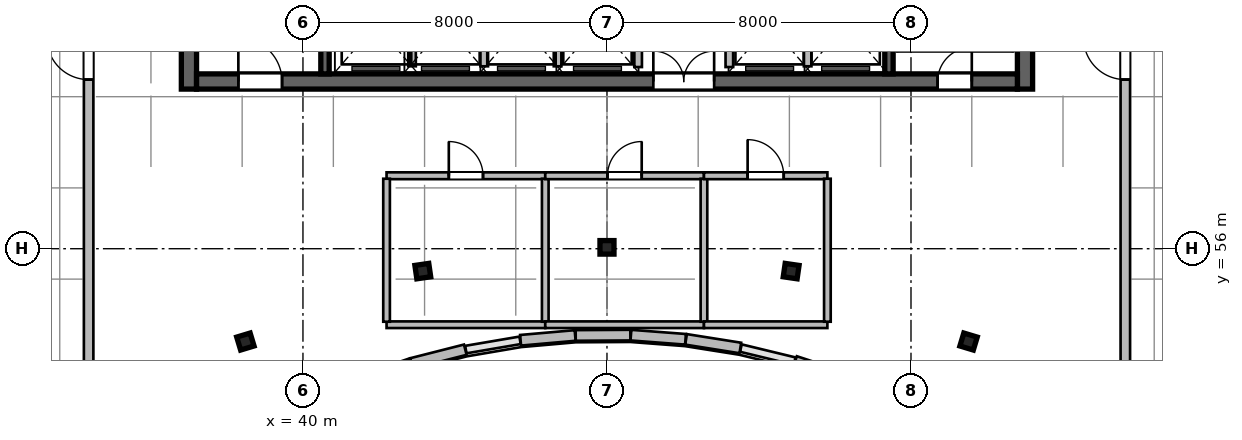
"""IFC4 building model, lengths in metres.
Left out: names, types, materials, properties, quantities, classifications, styles, units other than length and angle.
Written with IfcOpenShell. Run it as: python <this file> out.ifc"""

import sys

from ifc_helpers import new_model, si_unit, direction, frame, frame_2d, origin, origin_2d, place, context, subcontext, project, spatial, rectangle, i_section, extrude, source, transform, mapped, element, fill, save


model = new_model("IFC4")
c1 = context("Model", 3, precision=1e-05, world=origin(), true_north=direction((0.0, 1.0)))
c2 = subcontext(c1, "Body", "Model", "MODEL_VIEW")
j1 = project(units=[si_unit("LENGTHUNIT", "METRE"), si_unit("PLANEANGLEUNIT", "RADIAN")], contexts=[c1])
p1 = place(None, origin())
s1 = spatial("IfcSite", under=j1, at=p1, CompositionType="ELEMENT")
p2 = place(p1, origin())
s2 = spatial("IfcBuilding", under=s1, at=p2, CompositionType="ELEMENT")
p3 = place(p2, frame((0.0, 0.0, 307.8)))
s3 = spatial("IfcBuildingStorey", under=s2, at=p3, CompositionType="ELEMENT", Elevation=307.8)
m1 = source(origin(), c2, "Body", "SweptSolid", [
    extrude(rectangle(XDim=12.0, YDim=0.4, at=frame_2d((6.0, 0.0))), origin(), (0.0, 0.0, 1.0), 4.8),
])
for number, where, z_axis, x_axis in (
    (1, (37.0, 60.2, 0.0), (0.0, 0.0, 1.0), (0.0, 1.0, 0.0)),
    (2, (59.0, 60.2, 0.0), (0.0, 0.0, 1.0), (0.0, 1.0, 0.0)),
):
    element("IfcWall", number, at=place(p3, frame(where, z_axis=z_axis, x_axis=x_axis)), inside=s3, PredefinedType="SHEAR", context=c2, shape_type="MappedRepresentation", body=[
        mapped(m1, transform((0.0, 0.0, 0.0), scale=1.0)),
    ])
m2 = source(origin(), c2, "Body", "SweptSolid", [
    extrude(rectangle(XDim=21.6, YDim=0.4, at=frame_2d((10.8, 0.0))), origin(), (0.0, 0.0, 1.0), 4.8),
])
p4 = place(p3, frame((37.2, 60.4, 0.0), z_axis=(0.0, 0.0, 1.0), x_axis=(1.0, 0.0, 0.0)))
e3 = element("IfcWall", 3, at=p4, inside=s3, PredefinedType="SHEAR", context=c2, shape_type="MappedRepresentation", body=[
    mapped(m2, transform((0.0, 0.0, 0.0), scale=1.0)),
])
p5 = place(p4, frame((1.1, 0.0, 0.0)))
e4 = element("IfcOpeningElement", 4, at=p5, cuts=e3, PredefinedType="OPENING", context=c2, shape_type="SweptSolid", body=[
    extrude(rectangle(XDim=1.15, YDim=2.15, at=frame_2d((0.575, 1.075))), frame((0.0, 0.21, 0.0), z_axis=(0.0, -1.0, 0.0), x_axis=(1.0, 0.0, 0.0)), (0.0, 0.0, 1.0), 0.42),
])
p6 = place(p4, frame((19.5, 0.0, 0.0)))
e5 = element("IfcOpeningElement", 5, at=p6, cuts=e3, PredefinedType="OPENING", context=c2, shape_type="SweptSolid", body=[
    extrude(rectangle(XDim=0.9, YDim=2.1, at=frame_2d((0.45, 1.05))), frame((0.0, 0.21, 0.0), z_axis=(0.0, -1.0, 0.0), x_axis=(1.0, 0.0, 0.0)), (0.0, 0.0, 1.0), 0.42),
])
p7 = place(p4, frame((12.02, 0.0, 0.0)))
e6 = element("IfcOpeningElement", 6, at=p7, cuts=e3, PredefinedType="OPENING", context=c2, shape_type="SweptSolid", body=[
    extrude(rectangle(XDim=1.6, YDim=2.15, at=frame_2d((0.8, 1.075))), frame((0.0, 0.21, 0.0), z_axis=(0.0, -1.0, 0.0), x_axis=(1.0, 0.0, 0.0)), (0.0, 0.0, 1.0), 0.42),
])
m3 = source(origin(), c2, "Body", "SweptSolid", [
    extrude(rectangle(XDim=11.2, YDim=0.22, at=frame_2d((5.6, 0.0))), origin(), (0.0, 0.0, 1.0), 4.8),
])
p8 = place(p3, frame((40.58, 60.6, 0.0), z_axis=(0.0, 0.0, 1.0), x_axis=(0.0, 1.0, 0.0)))
e7 = element("IfcWall", 7, at=p8, inside=s3, PredefinedType="SHEAR", context=c2, shape_type="MappedRepresentation", body=[
    mapped(m3, transform((0.0, 0.0, 0.0), scale=1.0)),
])
p9 = place(p3, frame((55.42, 60.6, 0.0), z_axis=(0.0, 0.0, 1.0), x_axis=(0.0, 1.0, 0.0)))
e8 = element("IfcWall", 8, at=p9, inside=s3, PredefinedType="SHEAR", context=c2, shape_type="MappedRepresentation", body=[
    mapped(m3, transform((0.0, 0.0, 0.0), scale=1.0)),
])
p10 = place(p9, frame((9.645, 0.0, 0.0)))
e9 = element("IfcOpeningElement", 9, at=p10, cuts=e8, PredefinedType="OPENING", context=c2, shape_type="SweptSolid", body=[
    extrude(rectangle(XDim=1.15, YDim=2.15, at=frame_2d((0.575, 1.075))), frame((0.0, 0.12, 0.0), z_axis=(0.0, -1.0, 0.0), x_axis=(1.0, 0.0, 0.0)), (0.0, 0.0, 1.0), 0.24),
])
m4 = source(origin(), c2, "Body", "SweptSolid", [
    extrude(i_section(OverallWidth=0.369, OverallDepth=0.356, WebThickness=0.011, FlangeThickness=0.018, at=origin_2d()), origin(), (0.0, 0.0, 1.0), 4.8),
])
for number, where, z_axis, x_axis in (
    (10, (38.485, 53.558, 0.0), (0.0, 0.0, 1.0), (-0.289, 0.957, 0.0)),
    (11, (43.154, 55.411, 0.0), (0.0, 0.0, 1.0), (-0.143, 0.99, 0.0)),
    (12, (48.0, 56.036, 0.0), (0.0, 0.0, 1.0), (0.0, 1.0, 0.0)),
    (13, (52.846, 55.411, 0.0), (0.0, 0.0, 1.0), (0.143, 0.99, 0.0)),
    (14, (57.515, 53.558, 0.0), (0.0, 0.0, 1.0), (0.289, 0.957, 0.0)),
):
    element("IfcColumn", number, at=place(p3, frame(where, z_axis=z_axis, x_axis=x_axis)), inside=s3, PredefinedType="COLUMN", context=c2, shape_type="MappedRepresentation", body=[
        mapped(m4, transform((0.0, 0.0, 0.0), scale=1.0)),
    ])
m5 = source(origin(), c2, "Body", "SweptSolid", [
    extrude(rectangle(XDim=1.47, YDim=0.28, at=frame_2d((0.735, 0.0))), origin(), (0.0, 0.0, 1.0), 4.5),
])
p11 = place(p3, frame((54.35, 52.58, 0.0), z_axis=(0.0, 0.0, 1.0), x_axis=(-0.950248878954, 0.311491682145, 0.0)))
e15 = element("IfcWall", 15, at=p11, inside=s3, PredefinedType="SOLIDWALL", context=c2, shape_type="MappedRepresentation", body=[
    mapped(m5, transform((0.0, 0.0, 0.0), scale=1.0)),
])
m6 = source(origin(), c2, "Body", "SweptSolid", [
    extrude(rectangle(XDim=1.446, YDim=0.28, at=frame_2d((0.723, 0.0))), origin(), (0.0, 0.0, 1.0), 4.5),
])
p12 = place(p3, frame((51.509, 53.388, 0.0), z_axis=(0.0, 0.0, 1.0), x_axis=(-0.987650460941, 0.156673440642, 0.0)))
e16 = element("IfcWall", 16, at=p12, inside=s3, PredefinedType="SOLIDWALL", context=c2, shape_type="MappedRepresentation", body=[
    mapped(m6, transform((0.0, 0.0, 0.0), scale=1.0)),
])
m7 = source(origin(), c2, "Body", "SweptSolid", [
    extrude(rectangle(XDim=1.44, YDim=0.28, at=frame_2d((0.72, 0.0))), origin(), (0.0, 0.0, 1.0), 4.5),
])
p13 = place(p3, frame((50.066, 53.616, 0.0), z_axis=(0.0, 0.0, 1.0), x_axis=(-0.997124860794, 0.075776064736, 0.0)))
e17 = element("IfcWall", 17, at=p13, inside=s3, PredefinedType="SOLIDWALL", context=c2, shape_type="MappedRepresentation", body=[
    mapped(m7, transform((0.0, 0.0, 0.0), scale=1.0)),
])
m8 = source(origin(), c2, "Body", "SweptSolid", [
    extrude(rectangle(XDim=1.438, YDim=0.28, at=frame_2d((0.719, 0.0))), origin(), (0.0, 0.0, 1.0), 4.5),
])
p14 = place(p3, frame((48.615, 53.726, 0.0), z_axis=(0.0, 0.0, 1.0), x_axis=(-0.999982357135, -0.005940153174, 0.0)))
e18 = element("IfcWall", 18, at=p14, inside=s3, PredefinedType="SOLIDWALL", context=c2, shape_type="MappedRepresentation", body=[
    mapped(m8, transform((0.0, 0.0, 0.0), scale=1.0)),
])
m9 = source(origin(), c2, "Body", "SweptSolid", [
    extrude(rectangle(XDim=1.441, YDim=0.28, at=frame_2d((0.72, 0.0))), origin(), (0.0, 0.0, 1.0), 4.5),
])
p15 = place(p3, frame((47.162, 53.717, 0.0), z_axis=(0.0, 0.0, 1.0), x_axis=(-0.99617032352, -0.087433898101, 0.0)))
e19 = element("IfcWall", 19, at=p15, inside=s3, PredefinedType="SOLIDWALL", context=c2, shape_type="MappedRepresentation", body=[
    mapped(m9, transform((0.0, 0.0, 0.0), scale=1.0)),
])
m10 = source(origin(), c2, "Body", "SweptSolid", [
    extrude(rectangle(XDim=1.458, YDim=0.28, at=frame_2d((0.729, 0.0))), origin(), (0.0, 0.0, 1.0), 4.5),
])
p16 = place(p3, frame((44.271, 53.343, 0.0), z_axis=(0.0, 0.0, 1.0), x_axis=(-0.969109544438, -0.246630677083, 0.0)))
e20 = element("IfcWall", 20, at=p16, inside=s3, PredefinedType="SOLIDWALL", context=c2, shape_type="MappedRepresentation", body=[
    mapped(m10, transform((0.0, 0.0, 0.0), scale=1.0)),
])
m11 = source(origin(), c2, "Body", "SweptSolid", [
    extrude(rectangle(XDim=1.473, YDim=0.28, at=frame_2d((0.736, 0.0))), origin(), (0.0, 0.0, 1.0), 4.5),
])
p17 = place(p3, frame((42.845, 52.979, 0.0), z_axis=(0.0, 0.0, 1.0), x_axis=(-0.946641296917, -0.322289086026, 0.0)))
e21 = element("IfcWall", 21, at=p17, inside=s3, PredefinedType="SOLIDWALL", context=c2, shape_type="MappedRepresentation", body=[
    mapped(m11, transform((0.0, 0.0, 0.0), scale=1.0)),
])
m12 = source(origin(), c2, "Body", "SweptSolid", [
    extrude(rectangle(XDim=2.24, YDim=0.2, at=frame_2d((1.12, 0.0))), origin(), (0.0, 0.0, 1.0), 4.5),
])
for number, where, z_axis, x_axis in (
    (22, (48.82, 60.78, 0.0), (0.0, 0.0, 1.0), (0.0, 1.0, 0.0)),
    (23, (51.22, 60.78, 0.0), (0.0, 0.0, 1.0), (0.0, 1.0, 0.0)),
):
    element("IfcWall", number, at=place(p3, frame(where, z_axis=z_axis, x_axis=x_axis)), inside=s3, PredefinedType="SOLIDWALL", context=c2, shape_type="MappedRepresentation", body=[
        mapped(m12, transform((0.0, 0.0, 0.0), scale=1.0)),
    ])
m13 = source(origin(), c2, "Body", "SweptSolid", [
    extrude(rectangle(XDim=2.2, YDim=0.2, at=frame_2d((1.1, 0.0))), origin(), (0.0, 0.0, 1.0), 4.5),
])
for number, where, z_axis, x_axis in (
    (24, (42.87, 60.8, 0.0), (0.0, 0.0, 1.0), (0.0, 1.0, 0.0)),
    (25, (44.77, 60.8, 0.0), (0.0, 0.0, 1.0), (0.0, 1.0, 0.0)),
    (26, (46.7, 60.8, 0.0), (0.0, 0.0, 1.0), (0.0, 1.0, 0.0)),
    (27, (53.28, 60.8, 0.0), (0.0, 0.0, 1.0), (0.0, 1.0, 0.0)),
):
    element("IfcWall", number, at=place(p3, frame(where, z_axis=z_axis, x_axis=x_axis)), inside=s3, PredefinedType="SOLIDWALL", context=c2, shape_type="MappedRepresentation", body=[
        mapped(m13, transform((0.0, 0.0, 0.0), scale=1.0)),
    ])
m14 = source(origin(), c2, "Body", "SweptSolid", [
    extrude(rectangle(XDim=4.176, YDim=0.175, at=frame_2d((2.088, 0.0))), origin(), (0.0, 0.0, 1.0), 4.5),
])
p18 = place(p3, frame((42.2, 54.0, 0.0), z_axis=(0.0, 0.0, 1.0), x_axis=(1.0, 0.0, 0.0)))
e28 = element("IfcWall", 28, at=p18, inside=s3, PredefinedType="PARTITIONING", context=c2, shape_type="MappedRepresentation", body=[
    mapped(m14, transform((0.0, 0.0, 0.0), scale=1.0)),
])
m15 = source(origin(), c2, "Body", "SweptSolid", [
    extrude(rectangle(XDim=4.176, YDim=0.18, at=frame_2d((2.088, 0.0))), origin(), (0.0, 0.0, 1.0), 4.5),
])
p19 = place(p3, frame((42.2, 57.92, 0.0), z_axis=(0.0, 0.0, 1.0), x_axis=(1.0, 0.0, 0.0)))
e29 = element("IfcWall", 29, at=p19, inside=s3, PredefinedType="PLUMBINGWALL", context=c2, shape_type="MappedRepresentation", body=[
    mapped(m15, transform((0.0, 0.0, 0.0), scale=1.0)),
])
p20 = place(p19, frame((1.638, 0.0, 0.0)))
e30 = element("IfcOpeningElement", 30, at=p20, cuts=e29, PredefinedType="OPENING", context=c2, shape_type="SweptSolid", body=[
    extrude(rectangle(XDim=0.9, YDim=2.08, at=frame_2d((0.45, 1.04))), frame((0.0, 0.1, 0.0), z_axis=(0.0, -1.0, 0.0), x_axis=(1.0, 0.0, 0.0)), (0.0, 0.0, 1.0), 0.2),
])
m16 = source(origin(), c2, "Body", "SweptSolid", [
    extrude(rectangle(XDim=3.763, YDim=0.175, at=frame_2d((1.881, 0.0))), origin(), (0.0, 0.0, 1.0), 4.5),
])
for number, where, z_axis, x_axis in (
    (31, (42.2, 54.079, 0.0), (0.0, 0.0, 1.0), (0.0, 1.0, 0.0)),
    (32, (46.376, 54.079, 0.0), (0.0, 0.0, 1.0), (0.0, 1.0, 0.0)),
):
    element("IfcWall", number, at=place(p3, frame(where, z_axis=z_axis, x_axis=x_axis)), inside=s3, PredefinedType="PARTITIONING", context=c2, shape_type="MappedRepresentation", body=[
        mapped(m16, transform((0.0, 0.0, 0.0), scale=1.0)),
    ])
p21 = place(p3, frame((46.376, 54.0, 0.0), z_axis=(0.0, 0.0, 1.0), x_axis=(1.0, 0.0, 0.0)))
e33 = element("IfcWall", 33, at=p21, inside=s3, PredefinedType="PARTITIONING", context=c2, shape_type="MappedRepresentation", body=[
    mapped(m14, transform((0.0, 0.0, 0.0), scale=1.0)),
])
p22 = place(p3, frame((46.376, 57.92, 0.0), z_axis=(0.0, 0.0, 1.0), x_axis=(1.0, 0.0, 0.0)))
e34 = element("IfcWall", 34, at=p22, inside=s3, PredefinedType="PLUMBINGWALL", context=c2, shape_type="MappedRepresentation", body=[
    mapped(m15, transform((0.0, 0.0, 0.0), scale=1.0)),
])
p23 = place(p22, frame((1.638, 0.0, 0.0)))
e35 = element("IfcOpeningElement", 35, at=p23, cuts=e34, PredefinedType="OPENING", context=c2, shape_type="SweptSolid", body=[
    extrude(rectangle(XDim=0.9, YDim=2.08, at=frame_2d((0.45, 1.04))), frame((0.0, 0.1, 0.0), z_axis=(0.0, -1.0, 0.0), x_axis=(1.0, 0.0, 0.0)), (0.0, 0.0, 1.0), 0.2),
])
p24 = place(p3, frame((50.552, 54.079, 0.0), z_axis=(0.0, 0.0, 1.0), x_axis=(0.0, 1.0, 0.0)))
e36 = element("IfcWall", 36, at=p24, inside=s3, PredefinedType="PARTITIONING", context=c2, shape_type="MappedRepresentation", body=[
    mapped(m16, transform((0.0, 0.0, 0.0), scale=1.0)),
])
m17 = source(origin(), c2, "Body", "SweptSolid", [
    extrude(rectangle(XDim=3.248, YDim=0.175, at=frame_2d((1.624, 0.0))), origin(), (0.0, 0.0, 1.0), 4.5),
])
p25 = place(p3, frame((50.552, 54.0, 0.0), z_axis=(0.0, 0.0, 1.0), x_axis=(1.0, 0.0, 0.0)))
e37 = element("IfcWall", 37, at=p25, inside=s3, PredefinedType="PARTITIONING", context=c2, shape_type="MappedRepresentation", body=[
    mapped(m17, transform((0.0, 0.0, 0.0), scale=1.0)),
])
m18 = source(origin(), c2, "Body", "SweptSolid", [
    extrude(rectangle(XDim=3.248, YDim=0.18, at=frame_2d((1.624, 0.0))), origin(), (0.0, 0.0, 1.0), 4.5),
])
p26 = place(p3, frame((50.552, 57.92, 0.0), z_axis=(0.0, 0.0, 1.0), x_axis=(1.0, 0.0, 0.0)))
e38 = element("IfcWall", 38, at=p26, inside=s3, PredefinedType="PLUMBINGWALL", context=c2, shape_type="MappedRepresentation", body=[
    mapped(m18, transform((0.0, 0.0, 0.0), scale=1.0)),
])
p27 = place(p26, frame((1.149, 0.0, 0.0)))
e39 = element("IfcOpeningElement", 39, at=p27, cuts=e38, PredefinedType="OPENING", context=c2, shape_type="SweptSolid", body=[
    extrude(rectangle(XDim=0.95, YDim=2.12, at=frame_2d((0.475, 1.06))), frame((0.0, 0.1, 0.0), z_axis=(0.0, -1.0, 0.0), x_axis=(1.0, 0.0, 0.0)), (0.0, 0.0, 1.0), 0.2),
])
p28 = place(p3, frame((53.8, 54.079, 0.0), z_axis=(0.0, 0.0, 1.0), x_axis=(0.0, 1.0, 0.0)))
e40 = element("IfcWall", 40, at=p28, inside=s3, PredefinedType="PARTITIONING", context=c2, shape_type="MappedRepresentation", body=[
    mapped(m16, transform((0.0, 0.0, 0.0), scale=1.0)),
])
m19 = source(origin(), c2, "Body", "SweptSolid", [
    extrude(rectangle(XDim=15.081, YDim=0.25, at=frame_2d((7.541, 0.0))), origin(), (0.0, 0.0, 1.0), 4.5),
])
p29 = place(p3, frame((34.36, 47.969, 0.0), z_axis=(0.0, 0.0, 1.0), x_axis=(0.0, 1.0, 0.0)))
e41 = element("IfcWall", 41, at=p29, inside=s3, PredefinedType="PARTITIONING", context=c2, shape_type="MappedRepresentation", body=[
    mapped(m19, transform((0.0, 0.0, 0.0), scale=1.0)),
])
p30 = place(p29, frame((12.481, 0.0, 0.0)))
e42 = element("IfcOpeningElement", 42, at=p30, cuts=e41, PredefinedType="OPENING", context=c2, shape_type="SweptSolid", body=[
    extrude(rectangle(XDim=1.1, YDim=2.15, at=frame_2d((0.55, 1.075))), frame((0.0, 0.135, 0.0), z_axis=(0.0, -1.0, 0.0), x_axis=(1.0, 0.0, 0.0)), (0.0, 0.0, 1.0), 0.27),
])
m20 = source(origin(), c2, "Body", "SweptSolid", [
    extrude(rectangle(XDim=14.581, YDim=0.25, at=frame_2d((7.291, 0.0))), origin(), (0.0, 0.0, 1.0), 4.174),
])
p31 = place(p3, frame((61.64, 48.469, 0.0), z_axis=(0.0, 0.0, 1.0), x_axis=(0.0, 1.0, 0.0)))
e43 = element("IfcWall", 43, at=p31, inside=s3, PredefinedType="PARTITIONING", context=c2, shape_type="MappedRepresentation", body=[
    mapped(m20, transform((0.0, 0.0, 0.0), scale=1.0)),
])
p32 = place(p31, frame((11.981, 0.0, 0.0)))
e44 = element("IfcOpeningElement", 44, at=p32, cuts=e43, PredefinedType="OPENING", context=c2, shape_type="SweptSolid", body=[
    extrude(rectangle(XDim=1.1, YDim=2.15, at=frame_2d((0.55, 1.075))), frame((0.0, 0.135, 0.0), z_axis=(0.0, -1.0, 0.0), x_axis=(1.0, 0.0, 0.0)), (0.0, 0.0, 1.0), 0.27),
])
m21 = source(origin(), c2, "Body", "SweptSolid", [
    extrude(rectangle(XDim=1.15, YDim=2.15, at=frame_2d((0.575, 1.075))), frame((0.0, 0.025, 0.0), z_axis=(0.0, -1.0, 0.0), x_axis=(1.0, 0.0, 0.0)), (0.0, 0.0, 1.0), 0.05),
])
p33 = place(p5, origin())
e45 = element("IfcDoor", 45, at=p33, inside=s3, OperationType="SINGLE_SWING_LEFT", PredefinedType="DOOR", context=c2, shape_type="MappedRepresentation", body=[
    mapped(m21, transform((0.0, 0.0, 0.0), scale=1.0)),
])
fill(e4, e45)
m22 = source(origin(), c2, "Body", "SweptSolid", [
    extrude(rectangle(XDim=0.9, YDim=2.1, at=frame_2d((0.45, 1.05))), frame((0.0, 0.025, 0.0), z_axis=(0.0, -1.0, 0.0), x_axis=(1.0, 0.0, 0.0)), (0.0, 0.0, 1.0), 0.05),
])
p34 = place(p6, origin())
e46 = element("IfcDoor", 46, at=p34, inside=s3, OperationType="SINGLE_SWING_RIGHT", PredefinedType="DOOR", context=c2, shape_type="MappedRepresentation", body=[
    mapped(m22, transform((0.0, 0.0, 0.0), scale=1.0)),
])
fill(e5, e46)
m23 = source(origin(), c2, "Body", "SweptSolid", [
    extrude(rectangle(XDim=1.6, YDim=2.15, at=frame_2d((0.8, 1.075))), frame((0.0, 0.025, 0.0), z_axis=(0.0, -1.0, 0.0), x_axis=(1.0, 0.0, 0.0)), (0.0, 0.0, 1.0), 0.05),
])
p35 = place(p7, origin())
e47 = element("IfcDoor", 47, at=p35, inside=s3, OperationType="DOUBLE_DOOR_SINGLE_SWING", PredefinedType="DOOR", context=c2, shape_type="MappedRepresentation", body=[
    mapped(m23, transform((0.0, 0.0, 0.0), scale=1.0)),
])
fill(e6, e47)
m24 = source(origin(), c2, "Body", "SweptSolid", [
    extrude(rectangle(XDim=0.9, YDim=2.08, at=frame_2d((0.45, 1.04))), frame((0.0, 0.025, 0.0), z_axis=(0.0, -1.0, 0.0), x_axis=(1.0, 0.0, 0.0)), (0.0, 0.0, 1.0), 0.05),
])
p36 = place(p20, origin())
e48 = element("IfcDoor", 48, at=p36, inside=s3, OperationType="SINGLE_SWING_LEFT", PredefinedType="DOOR", context=c2, shape_type="MappedRepresentation", body=[
    mapped(m24, transform((0.0, 0.0, 0.0), scale=1.0)),
])
fill(e30, e48)
p37 = place(p23, origin())
e49 = element("IfcDoor", 49, at=p37, inside=s3, OperationType="SINGLE_SWING_RIGHT", PredefinedType="DOOR", context=c2, shape_type="MappedRepresentation", body=[
    mapped(m24, transform((0.0, 0.0, 0.0), scale=1.0)),
])
fill(e35, e49)
m25 = source(origin(), c2, "Body", "SweptSolid", [
    extrude(rectangle(XDim=0.95, YDim=2.12, at=frame_2d((0.475, 1.06))), frame((0.0, 0.025, 0.0), z_axis=(0.0, -1.0, 0.0), x_axis=(1.0, 0.0, 0.0)), (0.0, 0.0, 1.0), 0.05),
])
p38 = place(p27, origin())
e50 = element("IfcDoor", 50, at=p38, inside=s3, OperationType="SINGLE_SWING_LEFT", PredefinedType="DOOR", context=c2, shape_type="MappedRepresentation", body=[
    mapped(m25, transform((0.0, 0.0, 0.0), scale=1.0)),
])
fill(e39, e50)
m26 = source(origin(), c2, "Body", "SweptSolid", [
    extrude(rectangle(XDim=1.1, YDim=2.15, at=frame_2d((0.55, 1.075))), frame((0.0, 0.025, 0.0), z_axis=(0.0, -1.0, 0.0), x_axis=(1.0, 0.0, 0.0)), (0.0, 0.0, 1.0), 0.05),
])
p39 = place(p30, origin())
e51 = element("IfcDoor", 51, at=p39, inside=s3, OperationType="SINGLE_SWING_RIGHT", PredefinedType="DOOR", context=c2, shape_type="MappedRepresentation", body=[
    mapped(m26, transform((0.0, 0.0, 0.0), scale=1.0)),
])
fill(e42, e51)
p40 = place(p32, origin())
e52 = element("IfcDoor", 52, at=p40, inside=s3, OperationType="SINGLE_SWING_RIGHT", PredefinedType="DOOR", context=c2, shape_type="MappedRepresentation", body=[
    mapped(m26, transform((0.0, 0.0, 0.0), scale=1.0)),
])
fill(e44, e52)
save(model, sys.argv[1])
